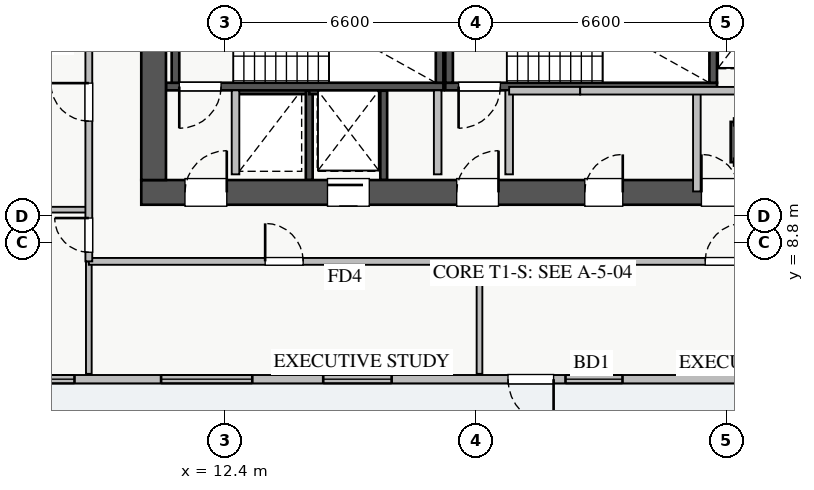
"""IFC4 building model, lengths in metres.
Left out: names, types, materials, properties, quantities, classifications, styles, units other than length and angle.
Written with IfcOpenShell. Run it as: python <this file> out.ifc"""

import sys

from ifc_helpers import new_model, si_unit, direction, frame, frame_2d, origin, place, context, subcontext, project, spatial, rectangle, extrude, source, transform, mapped, element, fill, save


model = new_model("IFC4")
c1 = context("Model", 3, precision=1e-05, world=origin(), true_north=direction((0.0, 1.0)))
c2 = subcontext(c1, "Body", "Model", "MODEL_VIEW")
j1 = project(units=[si_unit("LENGTHUNIT", "METRE"), si_unit("PLANEANGLEUNIT", "RADIAN")], contexts=[c1])
p1 = place(None, origin())
s1 = spatial("IfcSite", under=j1, at=p1, CompositionType="ELEMENT")
p2 = place(p1, origin())
s2 = spatial("IfcBuilding", under=s1, at=p2, CompositionType="ELEMENT")
p3 = place(p2, frame((0.0, 0.0, 97.0)))
s3 = spatial("IfcBuildingStorey", under=s2, at=p3, CompositionType="ELEMENT", Elevation=97.0)
p4 = place(p3, frame((12.68, 12.8, 0.0), z_axis=(0.0, 0.0, 1.0), x_axis=(1.0, 0.0, 0.0)))
e1 = element("IfcWall", 1, at=p4, inside=s3, PredefinedType="SHEAR", context=c2, shape_type="SweptSolid", body=[
    extrude(rectangle(XDim=1.94, YDim=0.18, at=frame_2d((0.97, 0.0))), origin(), (0.0, 0.0, 1.0), 3.07),
])
p5 = place(p3, frame((14.62, 10.45, 0.0), z_axis=(0.0, 0.0, 1.0), x_axis=(0.0, 1.0, 0.0)))
e2 = element("IfcWall", 2, at=p5, inside=s3, PredefinedType="SHEAR", context=c2, shape_type="SweptSolid", body=[
    extrude(rectangle(XDim=2.35, YDim=0.18, at=frame_2d((1.175, 0.0))), origin(), (0.0, 0.0, 1.0), 3.07),
])
p6 = place(p3, frame((25.8, 10.92, 0.0), z_axis=(0.0, 0.0, 1.0), x_axis=(0.0, 1.0, 0.0)))
e3 = element("IfcWall", 3, at=p6, inside=s3, PredefinedType="SHEAR", context=c2, shape_type="SweptSolid", body=[
    extrude(rectangle(XDim=1.06, YDim=0.18, at=frame_2d((0.53, 0.0))), origin(), (0.0, 0.0, 1.0), 3.07),
])
for number, where, z_axis, x_axis in (
    (4, (25.8, 11.98, 0.0), (0.0, 0.0, 1.0), (1.0, 0.0, 0.0)),
    (5, (25.8, 10.92, 0.0), (0.0, 0.0, 1.0), (1.0, 0.0, 0.0)),
):
    element("IfcWall", number, at=place(p3, frame(where, z_axis=z_axis, x_axis=x_axis)), inside=s3, PredefinedType="SHEAR", context=c2, shape_type="SweptSolid", body=[
        extrude(rectangle(XDim=1.35, YDim=0.18, at=frame_2d((0.675, 0.0))), origin(), (0.0, 0.0, 1.0), 3.07),
    ])
p7 = place(p3, frame((14.62, 12.8, 0.0), z_axis=(0.0, 0.0, 1.0), x_axis=(1.0, 0.0, 0.0)))
e6 = element("IfcWall", 6, at=p7, inside=s3, PredefinedType="SHEAR", context=c2, shape_type="SweptSolid", body=[
    extrude(rectangle(XDim=1.96, YDim=0.18, at=frame_2d((0.98, 0.0))), origin(), (0.0, 0.0, 1.0), 3.07),
])
p8 = place(p3, frame((16.58, 10.45, 0.0), z_axis=(0.0, 0.0, 1.0), x_axis=(0.0, 1.0, 0.0)))
e7 = element("IfcWall", 7, at=p8, inside=s3, PredefinedType="SHEAR", context=c2, shape_type="SweptSolid", body=[
    extrude(rectangle(XDim=2.35, YDim=0.18, at=frame_2d((1.175, 0.0))), origin(), (0.0, 0.0, 1.0), 3.07),
])
p9 = place(p3, frame((10.85, 12.91, 0.0), z_axis=(0.0, 0.0, 1.0), x_axis=(1.0, 0.0, 0.0)))
e8 = element("IfcWall", 8, at=p9, inside=s3, PredefinedType="SHEAR", context=c2, shape_type="SweptSolid", body=[
    extrude(rectangle(XDim=7.3, YDim=0.2, at=frame_2d((3.65, 0.0))), origin(), (0.0, 0.0, 1.0), 3.25),
])
p10 = place(p9, frame((0.35, 0.0, 0.0)))
e9 = element("IfcOpeningElement", 9, at=p10, cuts=e8, PredefinedType="OPENING", context=c2, shape_type="SweptSolid", body=[
    extrude(rectangle(XDim=1.1, YDim=2.05, at=frame_2d((0.55, 1.025))), frame((0.0, 0.11, 0.0), z_axis=(0.0, -1.0, 0.0), x_axis=(1.0, 0.0, 0.0)), (0.0, 0.0, 1.0), 0.22),
])
for number, where, z_axis, x_axis in (
    (10, (11.1, 13.01, 0.0), (0.0, 0.0, 1.0), (0.0, 1.0, 0.0)),
    (11, (18.05, 13.01, 0.0), (0.0, 0.0, 1.0), (0.0, 1.0, 0.0)),
):
    element("IfcWall", number, at=place(p3, frame(where, z_axis=z_axis, x_axis=x_axis)), inside=s3, PredefinedType="SHEAR", context=c2, shape_type="SweptSolid", body=[
        extrude(rectangle(XDim=2.94, YDim=0.2, at=frame_2d((1.47, 0.0))), origin(), (0.0, 0.0, 1.0), 3.25),
    ])
p11 = place(p3, frame((18.2, 12.91, 0.0), z_axis=(0.0, 0.0, 1.0), x_axis=(1.0, 0.0, 0.0)))
e12 = element("IfcWall", 12, at=p11, inside=s3, PredefinedType="SHEAR", context=c2, shape_type="SweptSolid", body=[
    extrude(rectangle(XDim=7.15, YDim=0.2, at=frame_2d((3.575, 0.0))), origin(), (0.0, 0.0, 1.0), 3.25),
])
p12 = place(p11, frame((0.35, 0.0, 0.0)))
e13 = element("IfcOpeningElement", 13, at=p12, cuts=e12, PredefinedType="OPENING", context=c2, shape_type="SweptSolid", body=[
    extrude(rectangle(XDim=1.1, YDim=2.05, at=frame_2d((0.55, 1.025))), frame((0.0, 0.11, 0.0), z_axis=(0.0, -1.0, 0.0), x_axis=(1.0, 0.0, 0.0)), (0.0, 0.0, 1.0), 0.22),
])
for number, where, z_axis, x_axis in (
    (14, (18.3, 13.01, 0.0), (0.0, 0.0, 1.0), (0.0, 1.0, 0.0)),
    (15, (25.25, 13.01, 0.0), (0.0, 0.0, 1.0), (0.0, 1.0, 0.0)),
):
    element("IfcWall", number, at=place(p3, frame(where, z_axis=z_axis, x_axis=x_axis)), inside=s3, PredefinedType="SHEAR", context=c2, shape_type="SweptSolid", body=[
        extrude(rectangle(XDim=2.94, YDim=0.2, at=frame_2d((1.47, 0.0))), origin(), (0.0, 0.0, 1.0), 3.25),
    ])
p13 = place(p3, frame((10.2, 10.125, 0.0), z_axis=(0.0, 0.0, 1.0), x_axis=(1.0, 0.0, 0.0)))
e16 = element("IfcWall", 16, at=p13, inside=s3, PredefinedType="SHEAR", context=c2, shape_type="SweptSolid", body=[
    extrude(rectangle(XDim=17.6, YDim=0.65, at=frame_2d((8.8, 0.0))), origin(), (0.0, 0.0, 1.0), 3.25),
])
p14 = place(p13, frame((1.15, 0.0, 0.0)))
e17 = element("IfcOpeningElement", 17, at=p14, cuts=e16, PredefinedType="OPENING", context=c2, shape_type="SweptSolid", body=[
    extrude(rectangle(XDim=1.1, YDim=2.05, at=frame_2d((0.55, 1.025))), frame((0.0, 0.335, 0.0), z_axis=(0.0, -1.0, 0.0), x_axis=(1.0, 0.0, 0.0)), (0.0, 0.0, 1.0), 0.67),
])
p15 = place(p13, frame((8.3, 0.0, 0.0)))
e18 = element("IfcOpeningElement", 18, at=p15, cuts=e16, PredefinedType="OPENING", context=c2, shape_type="SweptSolid", body=[
    extrude(rectangle(XDim=1.1, YDim=2.05, at=frame_2d((0.55, 1.025))), frame((0.0, 0.335, 0.0), z_axis=(0.0, -1.0, 0.0), x_axis=(1.0, 0.0, 0.0)), (0.0, 0.0, 1.0), 0.67),
])
p16 = place(p13, frame((4.9, 0.0, 0.0)))
e19 = element("IfcOpeningElement", 19, at=p16, cuts=e16, PredefinedType="OPENING", context=c2, shape_type="SweptSolid", body=[
    extrude(rectangle(XDim=1.1, YDim=2.05, at=frame_2d((0.55, 1.025))), frame((0.0, 0.335, 0.0), z_axis=(0.0, -1.0, 0.0), x_axis=(1.0, 0.0, 0.0)), (0.0, 0.0, 1.0), 0.67),
])
p17 = place(p13, frame((14.74, 0.0, 0.0)))
e20 = element("IfcOpeningElement", 20, at=p17, cuts=e16, PredefinedType="OPENING", context=c2, shape_type="SweptSolid", body=[
    extrude(rectangle(XDim=1.0, YDim=2.05, at=frame_2d((0.5, 1.025))), frame((0.0, 0.335, 0.0), z_axis=(0.0, -1.0, 0.0), x_axis=(1.0, 0.0, 0.0)), (0.0, 0.0, 1.0), 0.67),
])
p18 = place(p13, frame((11.67, 0.0, 0.0)))
e21 = element("IfcOpeningElement", 21, at=p18, cuts=e16, PredefinedType="OPENING", context=c2, shape_type="SweptSolid", body=[
    extrude(rectangle(XDim=1.0, YDim=2.05, at=frame_2d((0.5, 1.025))), frame((0.0, 0.335, 0.0), z_axis=(0.0, -1.0, 0.0), x_axis=(1.0, 0.0, 0.0)), (0.0, 0.0, 1.0), 0.67),
])
p19 = place(p3, frame((10.525, 10.45, 0.0), z_axis=(0.0, 0.0, 1.0), x_axis=(0.0, 1.0, 0.0)))
e22 = element("IfcWall", 22, at=p19, inside=s3, PredefinedType="SHEAR", context=c2, shape_type="SweptSolid", body=[
    extrude(rectangle(XDim=5.9, YDim=0.65, at=frame_2d((2.95, 0.0))), origin(), (0.0, 0.0, 1.0), 3.25),
])
p20 = place(p3, frame((6.55, 5.21, 0.0), z_axis=(0.0, 0.0, 1.0), x_axis=(1.0, 0.0, 0.0)))
e23 = element("IfcWall", 23, at=p20, inside=s3, PredefinedType="STANDARD", context=c2, shape_type="SweptSolid", body=[
    extrude(rectangle(XDim=24.9, YDim=0.22, at=frame_2d((12.45, 0.0))), origin(), (0.0, 0.0, 1.0), 2.61),
])
p21 = place(p20, frame((13.3, 0.0, 0.0)))
e24 = element("IfcOpeningElement", 24, at=p21, cuts=e23, PredefinedType="OPENING", context=c2, shape_type="SweptSolid", body=[
    extrude(rectangle(XDim=1.2, YDim=2.1, at=frame_2d((0.6, 1.05))), frame((0.0, 0.12, 0.0), z_axis=(0.0, -1.0, 0.0), x_axis=(1.0, 0.0, 0.0)), (0.0, 0.0, 1.0), 0.24),
])
p22 = place(p20, frame((0.393, 0.0, 0.9)))
e25 = element("IfcOpeningElement", 25, at=p22, cuts=e23, PredefinedType="OPENING", context=c2, shape_type="SweptSolid", body=[
    extrude(rectangle(XDim=1.5, YDim=1.5, at=frame_2d((0.75, 0.75))), frame((0.0, 0.12, 0.0), z_axis=(0.0, -1.0, 0.0), x_axis=(1.0, 0.0, 0.0)), (0.0, 0.0, 1.0), 0.24),
])
p23 = place(p20, frame((8.438, 0.0, 0.9)))
e26 = element("IfcOpeningElement", 26, at=p23, cuts=e23, PredefinedType="OPENING", context=c2, shape_type="SweptSolid", body=[
    extrude(rectangle(XDim=1.8, YDim=1.45, at=frame_2d((0.9, 0.725))), frame((0.0, 0.12, 0.0), z_axis=(0.0, -1.0, 0.0), x_axis=(1.0, 0.0, 0.0)), (0.0, 0.0, 1.0), 0.24),
])
p24 = place(p20, frame((14.813, 0.0, 0.9)))
e27 = element("IfcOpeningElement", 27, at=p24, cuts=e23, PredefinedType="OPENING", context=c2, shape_type="SweptSolid", body=[
    extrude(rectangle(XDim=1.5, YDim=1.45, at=frame_2d((0.75, 0.725))), frame((0.0, 0.12, 0.0), z_axis=(0.0, -1.0, 0.0), x_axis=(1.0, 0.0, 0.0)), (0.0, 0.0, 1.0), 0.24),
])
p25 = place(p20, frame((20.738, 0.0, 0.9)))
e28 = element("IfcOpeningElement", 28, at=p25, cuts=e23, PredefinedType="OPENING", context=c2, shape_type="SweptSolid", body=[
    extrude(rectangle(XDim=2.1, YDim=1.48, at=frame_2d((1.05, 0.74))), frame((0.0, 0.12, 0.0), z_axis=(0.0, -1.0, 0.0), x_axis=(1.0, 0.0, 0.0)), (0.0, 0.0, 1.0), 0.24),
])
p26 = place(p20, frame((4.171, 0.0, 0.9)))
e29 = element("IfcOpeningElement", 29, at=p26, cuts=e23, PredefinedType="OPENING", context=c2, shape_type="SweptSolid", body=[
    extrude(rectangle(XDim=2.4, YDim=1.5, at=frame_2d((1.2, 0.75))), frame((0.0, 0.12, 0.0), z_axis=(0.0, -1.0, 0.0), x_axis=(1.0, 0.0, 0.0)), (0.0, 0.0, 1.0), 0.24),
])
for number, where, z_axis, x_axis in (
    (30, (12.68, 10.6, 0.0), (0.0, 0.0, 1.0), (0.0, 1.0, 0.0)),
    (31, (18.0, 10.6, 0.0), (0.0, 0.0, 1.0), (0.0, 1.0, 0.0)),
    (32, (19.88, 10.6, 0.0), (0.0, 0.0, 1.0), (0.0, 1.0, 0.0)),
):
    element("IfcWall", number, at=place(p3, frame(where, z_axis=z_axis, x_axis=x_axis)), inside=s3, PredefinedType="PARTITIONING", context=c2, shape_type="SweptSolid", body=[
        extrude(rectangle(XDim=2.21, YDim=0.2, at=frame_2d((1.105, 0.0))), origin(), (0.0, 0.0, 1.0), 3.07),
    ])
p27 = place(p3, frame((24.82, 10.15, 0.0), z_axis=(0.0, 0.0, 1.0), x_axis=(0.0, 1.0, 0.0)))
e33 = element("IfcWall", 33, at=p27, inside=s3, PredefinedType="PARTITIONING", context=c2, shape_type="SweptSolid", body=[
    extrude(rectangle(XDim=2.65, YDim=0.2, at=frame_2d((1.325, 0.0))), origin(), (0.0, 0.0, 1.0), 3.07),
])
p28 = place(p3, frame((19.88, 12.8, 0.0), z_axis=(0.0, 0.0, 1.0), x_axis=(1.0, 0.0, 0.0)))
e34 = element("IfcWall", 34, at=p28, inside=s3, PredefinedType="PARTITIONING", context=c2, shape_type="SweptSolid", body=[
    extrude(rectangle(XDim=1.87, YDim=0.2, at=frame_2d((0.935, 0.0))), origin(), (0.0, 0.0, 1.0), 3.07),
])
p29 = place(p3, frame((21.75, 12.8, 0.0), z_axis=(0.0, 0.0, 1.0), x_axis=(1.0, 0.0, 0.0)))
e35 = element("IfcWall", 35, at=p29, inside=s3, PredefinedType="PARTITIONING", context=c2, shape_type="SweptSolid", body=[
    extrude(rectangle(XDim=5.17, YDim=0.2, at=frame_2d((2.585, 0.0))), origin(), (0.0, 0.0, 1.0), 3.07),
])
p30 = place(p3, frame((19.1, 5.35, 0.0), z_axis=(0.0, 0.0, 1.0), x_axis=(0.0, 1.0, 0.0)))
e36 = element("IfcWall", 36, at=p30, inside=s3, PredefinedType="PARTITIONING", context=c2, shape_type="SweptSolid", body=[
    extrude(rectangle(XDim=2.96, YDim=0.15, at=frame_2d((1.48, 0.0))), origin(), (0.0, 0.0, 1.0), 2.815),
])
p31 = place(p3, frame((8.82, 5.35, 0.0), z_axis=(0.0, 0.0, 1.0), x_axis=(0.0, 1.0, 0.0)))
e37 = element("IfcWall", 37, at=p31, inside=s3, PredefinedType="PARTITIONING", context=c2, shape_type="SweptSolid", body=[
    extrude(rectangle(XDim=2.96, YDim=0.15, at=frame_2d((1.48, 0.0))), origin(), (0.0, 0.0, 1.0), 3.07),
])
p32 = place(p3, frame((8.82, 8.31, 0.0), z_axis=(0.0, 0.0, 1.0), x_axis=(1.0, 0.0, 0.0)))
e38 = element("IfcWall", 38, at=p32, inside=s3, PredefinedType="PARTITIONING", context=c2, shape_type="SweptSolid", body=[
    extrude(rectangle(XDim=23.58, YDim=0.18, at=frame_2d((11.79, 0.0))), origin(), (0.0, 0.0, 1.0), 3.07),
])
p33 = place(p32, frame((4.64, 0.0, 0.0)))
e39 = element("IfcOpeningElement", 39, at=p33, cuts=e38, PredefinedType="OPENING", context=c2, shape_type="SweptSolid", body=[
    extrude(rectangle(XDim=1.0, YDim=2.05, at=frame_2d((0.5, 1.025))), frame((0.0, 0.1, 0.0), z_axis=(0.0, -1.0, 0.0), x_axis=(1.0, 0.0, 0.0)), (0.0, 0.0, 1.0), 0.2),
])
p34 = place(p32, frame((16.22, 0.0, 0.0)))
e40 = element("IfcOpeningElement", 40, at=p34, cuts=e38, PredefinedType="OPENING", context=c2, shape_type="SweptSolid", body=[
    extrude(rectangle(XDim=1.0, YDim=2.05, at=frame_2d((0.5, 1.025))), frame((0.0, 0.1, 0.0), z_axis=(0.0, -1.0, 0.0), x_axis=(1.0, 0.0, 0.0)), (0.0, 0.0, 1.0), 0.2),
])
p35 = place(p3, frame((1.35, 9.67, 0.0), z_axis=(0.0, 0.0, 1.0), x_axis=(1.0, 0.0, 0.0)))
e41 = element("IfcWall", 41, at=p35, inside=s3, PredefinedType="PARTITIONING", context=c2, shape_type="SweptSolid", body=[
    extrude(rectangle(XDim=7.47, YDim=0.15, at=frame_2d((3.735, 0.0))), origin(), (0.0, 0.0, 1.0), 3.07),
])
p36 = place(p3, frame((8.82, 8.31, 0.0), z_axis=(0.0, 0.0, 1.0), x_axis=(0.0, 1.0, 0.0)))
e42 = element("IfcWall", 42, at=p36, inside=s3, PredefinedType="PARTITIONING", context=c2, shape_type="SweptSolid", body=[
    extrude(rectangle(XDim=29.13, YDim=0.18, at=frame_2d((14.565, 0.0))), origin(), (0.0, 0.0, 1.0), 3.07),
])
p37 = place(p36, frame((27.94, 0.0, 0.0)))
e43 = element("IfcOpeningElement", 43, at=p37, cuts=e42, PredefinedType="OPENING", context=c2, shape_type="SweptSolid", body=[
    extrude(rectangle(XDim=0.9, YDim=2.05, at=frame_2d((0.45, 1.025))), frame((0.0, 0.1, 0.0), z_axis=(0.0, -1.0, 0.0), x_axis=(1.0, 0.0, 0.0)), (0.0, 0.0, 1.0), 0.2),
])
p38 = place(p36, frame((0.24, 0.0, 0.0)))
e44 = element("IfcOpeningElement", 44, at=p38, cuts=e42, PredefinedType="OPENING", context=c2, shape_type="SweptSolid", body=[
    extrude(rectangle(XDim=0.9, YDim=2.05, at=frame_2d((0.45, 1.025))), frame((0.0, 0.1, 0.0), z_axis=(0.0, -1.0, 0.0), x_axis=(1.0, 0.0, 0.0)), (0.0, 0.0, 1.0), 0.2),
])
p39 = place(p36, frame((3.69, 0.0, 0.0)))
e45 = element("IfcOpeningElement", 45, at=p39, cuts=e42, PredefinedType="OPENING", context=c2, shape_type="SweptSolid", body=[
    extrude(rectangle(XDim=1.0, YDim=2.05, at=frame_2d((0.5, 1.025))), frame((0.0, 0.1, 0.0), z_axis=(0.0, -1.0, 0.0), x_axis=(1.0, 0.0, 0.0)), (0.0, 0.0, 1.0), 0.2),
])
p40 = place(p36, frame((20.305, 0.0, 0.0)))
e46 = element("IfcOpeningElement", 46, at=p40, cuts=e42, PredefinedType="OPENING", context=c2, shape_type="SweptSolid", body=[
    extrude(rectangle(XDim=1.0, YDim=2.05, at=frame_2d((0.5, 1.025))), frame((0.0, 0.1, 0.0), z_axis=(0.0, -1.0, 0.0), x_axis=(1.0, 0.0, 0.0)), (0.0, 0.0, 1.0), 0.2),
])
m1 = source(origin(), c2, "Body", "SweptSolid", [
    extrude(rectangle(XDim=1.2, YDim=2.1, at=frame_2d((0.6, 1.05))), frame((0.0, 0.025, 0.0), z_axis=(0.0, -1.0, 0.0), x_axis=(1.0, 0.0, 0.0)), (0.0, 0.0, 1.0), 0.05),
])
p41 = place(p21, frame((1.2, 0.0, 0.0), z_axis=(0.0, 0.0, 1.0), x_axis=(-1.0, 0.0, 0.0)))
e47 = element("IfcDoor", 47, at=p41, inside=s3, OperationType="SINGLE_SWING_RIGHT", PredefinedType="DOOR", context=c2, shape_type="MappedRepresentation", body=[
    mapped(m1, transform((0.0, 0.0, 0.0), x_axis=(1.0, 0.0, 0.0), y_axis=(0.0, 1.0, 0.0), z_axis=(0.0, 0.0, 1.0), scale=1.0)),
])
fill(e24, e47)
m2 = source(origin(), c2, "Body", "SweptSolid", [
    extrude(rectangle(XDim=1.5, YDim=1.5, at=frame_2d((0.75, 0.75))), frame((0.0, 0.03, 0.0), z_axis=(0.0, -1.0, 0.0), x_axis=(1.0, 0.0, 0.0)), (0.0, 0.0, 1.0), 0.06),
])
p42 = place(p22, origin())
e48 = element("IfcWindow", 48, at=p42, inside=s3, PartitioningType="TRIPLE_PANEL_VERTICAL", PredefinedType="WINDOW", context=c2, shape_type="MappedRepresentation", body=[
    mapped(m2, transform((0.0, 0.0, 0.0), x_axis=(1.0, 0.0, 0.0), y_axis=(0.0, 1.0, 0.0), z_axis=(0.0, 0.0, 1.0), scale=1.0)),
])
fill(e25, e48)
m3 = source(origin(), c2, "Body", "SweptSolid", [
    extrude(rectangle(XDim=1.8, YDim=1.45, at=frame_2d((0.9, 0.725))), frame((0.0, 0.03, 0.0), z_axis=(0.0, -1.0, 0.0), x_axis=(1.0, 0.0, 0.0)), (0.0, 0.0, 1.0), 0.06),
])
p43 = place(p23, origin())
e49 = element("IfcWindow", 49, at=p43, inside=s3, PartitioningType="DOUBLE_PANEL_VERTICAL", PredefinedType="WINDOW", context=c2, shape_type="MappedRepresentation", body=[
    mapped(m3, transform((0.0, 0.0, 0.0), x_axis=(1.0, 0.0, 0.0), y_axis=(0.0, 1.0, 0.0), z_axis=(0.0, 0.0, 1.0), scale=1.0)),
])
fill(e26, e49)
m4 = source(origin(), c2, "Body", "SweptSolid", [
    extrude(rectangle(XDim=1.5, YDim=1.45, at=frame_2d((0.75, 0.725))), frame((0.0, 0.03, 0.0), z_axis=(0.0, -1.0, 0.0), x_axis=(1.0, 0.0, 0.0)), (0.0, 0.0, 1.0), 0.06),
])
p44 = place(p24, origin())
e50 = element("IfcWindow", 50, at=p44, inside=s3, PartitioningType="DOUBLE_PANEL_VERTICAL", PredefinedType="WINDOW", context=c2, shape_type="MappedRepresentation", body=[
    mapped(m4, transform((0.0, 0.0, 0.0), x_axis=(1.0, 0.0, 0.0), y_axis=(0.0, 1.0, 0.0), z_axis=(0.0, 0.0, 1.0), scale=1.0)),
])
fill(e27, e50)
m5 = source(origin(), c2, "Body", "SweptSolid", [
    extrude(rectangle(XDim=1.1, YDim=2.05, at=frame_2d((0.55, 1.025))), frame((0.0, 0.025, 0.0), z_axis=(0.0, -1.0, 0.0), x_axis=(1.0, 0.0, 0.0)), (0.0, 0.0, 1.0), 0.05),
])
p45 = place(p14, origin())
e51 = element("IfcDoor", 51, at=p45, inside=s3, OperationType="SINGLE_SWING_RIGHT", PredefinedType="DOOR", context=c2, shape_type="MappedRepresentation", body=[
    mapped(m5, transform((0.0, 0.0, 0.0), x_axis=(1.0, 0.0, 0.0), y_axis=(0.0, 1.0, 0.0), z_axis=(0.0, 0.0, 1.0), scale=1.0)),
])
fill(e17, e51)
p46 = place(p10, frame((1.1, 0.0, 0.0), z_axis=(0.0, 0.0, 1.0), x_axis=(-1.0, 0.0, 0.0)))
e52 = element("IfcDoor", 52, at=p46, inside=s3, OperationType="SINGLE_SWING_LEFT", PredefinedType="DOOR", context=c2, shape_type="MappedRepresentation", body=[
    mapped(m5, transform((0.0, 0.0, 0.0), x_axis=(1.0, 0.0, 0.0), y_axis=(0.0, 1.0, 0.0), z_axis=(0.0, 0.0, 1.0), scale=1.0)),
])
fill(e9, e52)
p47 = place(p15, origin())
e53 = element("IfcDoor", 53, at=p47, inside=s3, OperationType="SINGLE_SWING_RIGHT", PredefinedType="DOOR", context=c2, shape_type="MappedRepresentation", body=[
    mapped(m5, transform((0.0, 0.0, 0.0), x_axis=(1.0, 0.0, 0.0), y_axis=(0.0, 1.0, 0.0), z_axis=(0.0, 0.0, 1.0), scale=1.0)),
])
fill(e18, e53)
p48 = place(p12, frame((1.1, 0.0, 0.0), z_axis=(0.0, 0.0, 1.0), x_axis=(-1.0, 0.0, 0.0)))
e54 = element("IfcDoor", 54, at=p48, inside=s3, OperationType="SINGLE_SWING_LEFT", PredefinedType="DOOR", context=c2, shape_type="MappedRepresentation", body=[
    mapped(m5, transform((0.0, 0.0, 0.0), x_axis=(1.0, 0.0, 0.0), y_axis=(0.0, 1.0, 0.0), z_axis=(0.0, 0.0, 1.0), scale=1.0)),
])
fill(e13, e54)
p49 = place(p16, origin())
e55 = element("IfcDoor", 55, at=p49, inside=s3, OperationType="SLIDING_TO_RIGHT", PredefinedType="DOOR", context=c2, shape_type="MappedRepresentation", body=[
    mapped(m5, transform((0.0, 0.0, 0.0), x_axis=(1.0, 0.0, 0.0), y_axis=(0.0, 1.0, 0.0), z_axis=(0.0, 0.0, 1.0), scale=1.0)),
])
fill(e19, e55)
m6 = source(origin(), c2, "Body", "SweptSolid", [
    extrude(rectangle(XDim=1.0, YDim=2.05, at=frame_2d((0.5, 1.025))), frame((0.0, 0.025, 0.0), z_axis=(0.0, -1.0, 0.0), x_axis=(1.0, 0.0, 0.0)), (0.0, 0.0, 1.0), 0.05),
])
p50 = place(p17, origin())
e56 = element("IfcDoor", 56, at=p50, inside=s3, OperationType="SINGLE_SWING_LEFT", PredefinedType="DOOR", context=c2, shape_type="MappedRepresentation", body=[
    mapped(m6, transform((0.0, 0.0, 0.0), x_axis=(1.0, 0.0, 0.0), y_axis=(0.0, 1.0, 0.0), z_axis=(0.0, 0.0, 1.0), scale=1.0)),
])
fill(e20, e56)
p51 = place(p18, origin())
e57 = element("IfcDoor", 57, at=p51, inside=s3, OperationType="SINGLE_SWING_RIGHT", PredefinedType="DOOR", context=c2, shape_type="MappedRepresentation", body=[
    mapped(m6, transform((0.0, 0.0, 0.0), x_axis=(1.0, 0.0, 0.0), y_axis=(0.0, 1.0, 0.0), z_axis=(0.0, 0.0, 1.0), scale=1.0)),
])
fill(e21, e57)
p52 = place(p33, origin())
e58 = element("IfcDoor", 58, at=p52, inside=s3, OperationType="SINGLE_SWING_LEFT", PredefinedType="DOOR", context=c2, shape_type="MappedRepresentation", body=[
    mapped(m6, transform((0.0, 0.0, 0.0), x_axis=(1.0, 0.0, 0.0), y_axis=(0.0, 1.0, 0.0), z_axis=(0.0, 0.0, 1.0), scale=1.0)),
])
fill(e39, e58)
p53 = place(p34, origin())
e59 = element("IfcDoor", 59, at=p53, inside=s3, OperationType="SINGLE_SWING_RIGHT", PredefinedType="DOOR", context=c2, shape_type="MappedRepresentation", body=[
    mapped(m6, transform((0.0, 0.0, 0.0), x_axis=(1.0, 0.0, 0.0), y_axis=(0.0, 1.0, 0.0), z_axis=(0.0, 0.0, 1.0), scale=1.0)),
])
fill(e40, e59)
m7 = source(origin(), c2, "Body", "SweptSolid", [
    extrude(rectangle(XDim=0.9, YDim=2.05, at=frame_2d((0.45, 1.025))), frame((0.0, 0.025, 0.0), z_axis=(0.0, -1.0, 0.0), x_axis=(1.0, 0.0, 0.0)), (0.0, 0.0, 1.0), 0.05),
])
p54 = place(p38, origin())
e60 = element("IfcDoor", 60, at=p54, inside=s3, OperationType="SINGLE_SWING_RIGHT", PredefinedType="DOOR", context=c2, shape_type="MappedRepresentation", body=[
    mapped(m7, transform((0.0, 0.0, 0.0), x_axis=(1.0, 0.0, 0.0), y_axis=(0.0, 1.0, 0.0), z_axis=(0.0, 0.0, 1.0), scale=1.0)),
])
fill(e44, e60)
p55 = place(p39, origin())
e61 = element("IfcDoor", 61, at=p55, inside=s3, OperationType="SINGLE_SWING_RIGHT", PredefinedType="DOOR", context=c2, shape_type="MappedRepresentation", body=[
    mapped(m6, transform((0.0, 0.0, 0.0), x_axis=(1.0, 0.0, 0.0), y_axis=(0.0, 1.0, 0.0), z_axis=(0.0, 0.0, 1.0), scale=1.0)),
])
fill(e45, e61)
m8 = source(origin(), c2, "Body", "SweptSolid", [
    extrude(rectangle(XDim=2.4, YDim=1.5, at=frame_2d((1.2, 0.75))), frame((0.0, 0.03, 0.0), z_axis=(0.0, -1.0, 0.0), x_axis=(1.0, 0.0, 0.0)), (0.0, 0.0, 1.0), 0.06),
])
p56 = place(p26, origin())
e62 = element("IfcWindow", 62, at=p56, inside=s3, PartitioningType="TRIPLE_PANEL_VERTICAL", PredefinedType="WINDOW", context=c2, shape_type="MappedRepresentation", body=[
    mapped(m8, transform((0.0, 0.0, 0.0), x_axis=(1.0, 0.0, 0.0), y_axis=(0.0, 1.0, 0.0), z_axis=(0.0, 0.0, 1.0), scale=1.0)),
])
fill(e29, e62)
save(model, sys.argv[1])
